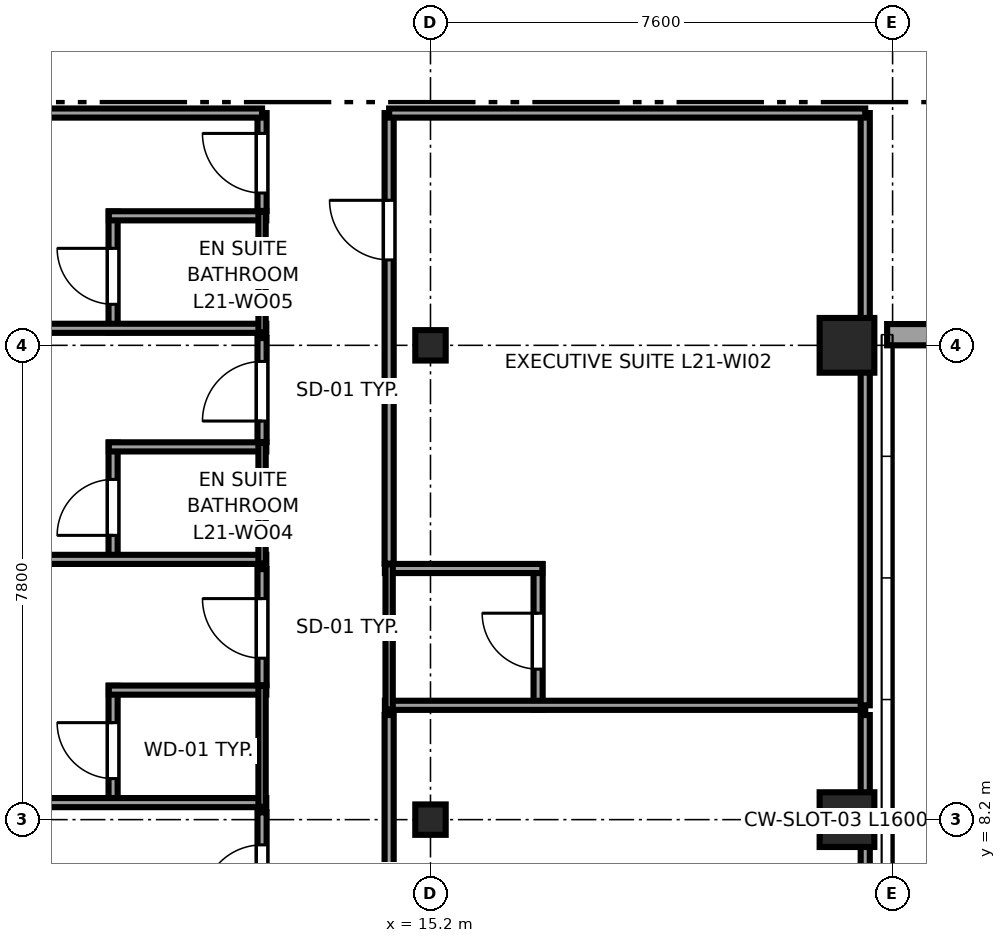
"""IFC4 building model, lengths in metres.
Left out: names, types, materials, properties, quantities, classifications, styles, units other than length and angle.
Written with IfcOpenShell. Run it as: python <this file> out.ifc"""

import sys

from ifc_helpers import new_model, si_unit, direction, frame, frame_2d, origin, origin_2d, place, context, subcontext, project, spatial, rectangle, i_section, extrude, source, transform, mapped, element, fill, save


model = new_model("IFC4")
c1 = context("Model", 3, precision=1e-05, world=origin(), true_north=direction((0.0, 1.0)))
c2 = subcontext(c1, "Body", "Model", "MODEL_VIEW")
j1 = project(units=[si_unit("LENGTHUNIT", "METRE"), si_unit("PLANEANGLEUNIT", "RADIAN")], contexts=[c1])
p1 = place(None, origin())
s1 = spatial("IfcSite", under=j1, at=p1, CompositionType="ELEMENT")
p2 = place(p1, origin())
s2 = spatial("IfcBuilding", under=s1, at=p2, CompositionType="ELEMENT")
p3 = place(p2, frame((0.0, 0.0, 85.25)))
s3 = spatial("IfcBuildingStorey", under=s2, at=p3, CompositionType="ELEMENT", Elevation=85.25)
m1 = source(origin(), c2, "Body", "SweptSolid", [
    extrude(i_section(OverallWidth=0.5, OverallDepth=0.5, WebThickness=0.022, FlangeThickness=0.034, at=origin_2d()), origin(), (0.0, 0.0, 1.0), 3.55),
])
for number, where, z_axis, x_axis in (
    (1, (15.2, 8.2, 0.0), (0.0, 0.0, 1.0), (1.0, 0.0, 0.0)),
    (2, (15.2, 16.0, 0.0), (0.0, 0.0, 1.0), (1.0, 0.0, 0.0)),
):
    element("IfcColumn", number, at=place(p3, frame(where, z_axis=z_axis, x_axis=x_axis)), inside=s3, PredefinedType="COLUMN", context=c2, shape_type="MappedRepresentation", body=[
        mapped(m1, transform((0.0, 0.0, 0.0), x_axis=(1.0, 0.0, 0.0), y_axis=(0.0, 1.0, 0.0), z_axis=(0.0, 0.0, 1.0), scale=1.0)),
    ])
m2 = source(origin(), c2, "Body", "SweptSolid", [
    extrude(rectangle(XDim=0.9, YDim=0.9, at=origin_2d()), origin(), (0.0, 0.0, 1.0), 3.55),
])
for number, where, z_axis, x_axis in (
    (3, (22.05, 8.2, 0.0), (0.0, 0.0, 1.0), (1.0, 0.0, 0.0)),
    (4, (22.05, 16.0, 0.0), (0.0, 0.0, 1.0), (1.0, 0.0, 0.0)),
):
    element("IfcColumn", number, at=place(p3, frame(where, z_axis=z_axis, x_axis=x_axis)), inside=s3, PredefinedType="COLUMN", context=c2, shape_type="MappedRepresentation", body=[
        mapped(m2, transform((0.0, 0.0, 0.0), x_axis=(1.0, 0.0, 0.0), y_axis=(0.0, 1.0, 0.0), z_axis=(0.0, 0.0, 1.0), scale=1.0)),
    ])
p4 = place(p3, frame((22.71, 16.175, 0.0), z_axis=(0.0, 0.0, 1.0), x_axis=(1.0, 0.0, 0.0)))
e5 = element("IfcWall", 5, at=p4, inside=s3, PredefinedType="SOLIDWALL", context=c2, shape_type="SweptSolid", body=[
    extrude(rectangle(XDim=11.58, YDim=0.35, at=frame_2d((5.79, 0.0))), origin(), (0.0, 0.0, 1.0), 2.748),
])
p5 = place(p4, frame((2.145, 0.0, 0.68)))
e6 = element("IfcOpeningElement", 6, at=p5, cuts=e5, PredefinedType="OPENING", context=c2, shape_type="SweptSolid", body=[
    extrude(rectangle(XDim=2.1, YDim=1.9, at=frame_2d((1.05, 0.95))), frame((0.0, 0.185, 0.0), z_axis=(0.0, -1.0, 0.0), x_axis=(1.0, 0.0, 0.0)), (0.0, 0.0, 1.0), 0.37),
])
p6 = place(p4, frame((7.335, 0.0, 0.68)))
e7 = element("IfcOpeningElement", 7, at=p6, cuts=e5, PredefinedType="OPENING", context=c2, shape_type="SweptSolid", body=[
    extrude(rectangle(XDim=2.1, YDim=1.9, at=frame_2d((1.05, 0.95))), frame((0.0, 0.185, 0.0), z_axis=(0.0, -1.0, 0.0), x_axis=(1.0, 0.0, 0.0)), (0.0, 0.0, 1.0), 0.37),
])
p7 = place(p3, frame((9.98, 8.41, 0.0), z_axis=(0.0, 0.0, 1.0), x_axis=(0.0, 1.0, 0.0)))
e8 = element("IfcWall", 8, at=p7, inside=s3, PredefinedType="PARTITIONING", context=c2, shape_type="SweptSolid", body=[
    extrude(rectangle(XDim=1.99, YDim=0.15, at=frame_2d((0.995, 0.0))), origin(), (0.0, 0.0, 1.0), 3.37),
])
p8 = place(p7, frame((0.465, 0.0, 0.0)))
e9 = element("IfcOpeningElement", 9, at=p8, cuts=e8, PredefinedType="OPENING", context=c2, shape_type="SweptSolid", body=[
    extrude(rectangle(XDim=0.92, YDim=2.01, at=frame_2d((0.46, 1.005))), frame((0.0, 0.085, 0.0), z_axis=(0.0, -1.0, 0.0), x_axis=(1.0, 0.0, 0.0)), (0.0, 0.0, 1.0), 0.17),
])
p9 = place(p3, frame((0.405, 8.48, 0.0), z_axis=(0.0, 0.0, 1.0), x_axis=(1.0, 0.0, 0.0)))
e10 = element("IfcWall", 10, at=p9, inside=s3, PredefinedType="PARTITIONING", context=c2, shape_type="SweptSolid", body=[
    extrude(rectangle(XDim=12.095, YDim=0.15, at=frame_2d((6.047, 0.0))), origin(), (0.0, 0.0, 1.0), 3.37),
])
p10 = place(p3, frame((9.91, 10.33, 0.0), z_axis=(0.0, 0.0, 1.0), x_axis=(1.0, 0.0, 0.0)))
e11 = element("IfcWall", 11, at=p10, inside=s3, PredefinedType="PARTITIONING", context=c2, shape_type="SweptSolid", body=[
    extrude(rectangle(XDim=2.59, YDim=0.15, at=frame_2d((1.295, 0.0))), origin(), (0.0, 0.0, 1.0), 3.37),
])
p11 = place(p3, frame((12.43, 8.41, 0.0), z_axis=(0.0, 0.0, 1.0), x_axis=(0.0, 1.0, 0.0)))
e12 = element("IfcWall", 12, at=p11, inside=s3, PredefinedType="PLUMBINGWALL", context=c2, shape_type="SweptSolid", body=[
    extrude(rectangle(XDim=1.99, YDim=0.12, at=frame_2d((0.995, 0.0))), origin(), (0.0, 0.0, 1.0), 3.37),
])
p12 = place(p3, frame((9.98, 12.41, 0.0), z_axis=(0.0, 0.0, 1.0), x_axis=(0.0, 1.0, 0.0)))
e13 = element("IfcWall", 13, at=p12, inside=s3, PredefinedType="PARTITIONING", context=c2, shape_type="SweptSolid", body=[
    extrude(rectangle(XDim=1.99, YDim=0.15, at=frame_2d((0.995, 0.0))), origin(), (0.0, 0.0, 1.0), 3.37),
])
p13 = place(p12, frame((0.465, 0.0, 0.0)))
e14 = element("IfcOpeningElement", 14, at=p13, cuts=e13, PredefinedType="OPENING", context=c2, shape_type="SweptSolid", body=[
    extrude(rectangle(XDim=0.92, YDim=2.01, at=frame_2d((0.46, 1.005))), frame((0.0, 0.085, 0.0), z_axis=(0.0, -1.0, 0.0), x_axis=(1.0, 0.0, 0.0)), (0.0, 0.0, 1.0), 0.17),
])
p14 = place(p3, frame((0.405, 12.48, 0.0), z_axis=(0.0, 0.0, 1.0), x_axis=(1.0, 0.0, 0.0)))
e15 = element("IfcWall", 15, at=p14, inside=s3, PredefinedType="PARTITIONING", context=c2, shape_type="SweptSolid", body=[
    extrude(rectangle(XDim=12.095, YDim=0.15, at=frame_2d((6.047, 0.0))), origin(), (0.0, 0.0, 1.0), 3.37),
])
p15 = place(p3, frame((9.91, 14.33, 0.0), z_axis=(0.0, 0.0, 1.0), x_axis=(1.0, 0.0, 0.0)))
e16 = element("IfcWall", 16, at=p15, inside=s3, PredefinedType="PARTITIONING", context=c2, shape_type="SweptSolid", body=[
    extrude(rectangle(XDim=2.59, YDim=0.15, at=frame_2d((1.295, 0.0))), origin(), (0.0, 0.0, 1.0), 3.37),
])
p16 = place(p3, frame((12.43, 12.41, 0.0), z_axis=(0.0, 0.0, 1.0), x_axis=(0.0, 1.0, 0.0)))
e17 = element("IfcWall", 17, at=p16, inside=s3, PredefinedType="PLUMBINGWALL", context=c2, shape_type="SweptSolid", body=[
    extrude(rectangle(XDim=1.99, YDim=0.12, at=frame_2d((0.995, 0.0))), origin(), (0.0, 0.0, 1.0), 3.37),
])
p17 = place(p3, frame((9.98, 16.21, 0.0), z_axis=(0.0, 0.0, 1.0), x_axis=(0.0, 1.0, 0.0)))
e18 = element("IfcWall", 18, at=p17, inside=s3, PredefinedType="PARTITIONING", context=c2, shape_type="SweptSolid", body=[
    extrude(rectangle(XDim=1.99, YDim=0.15, at=frame_2d((0.995, 0.0))), origin(), (0.0, 0.0, 1.0), 3.37),
])
p18 = place(p17, frame((0.465, 0.0, 0.0)))
e19 = element("IfcOpeningElement", 19, at=p18, cuts=e18, PredefinedType="OPENING", context=c2, shape_type="SweptSolid", body=[
    extrude(rectangle(XDim=0.92, YDim=2.01, at=frame_2d((0.46, 1.005))), frame((0.0, 0.085, 0.0), z_axis=(0.0, -1.0, 0.0), x_axis=(1.0, 0.0, 0.0)), (0.0, 0.0, 1.0), 0.17),
])
p19 = place(p3, frame((0.405, 16.28, 0.0), z_axis=(0.0, 0.0, 1.0), x_axis=(1.0, 0.0, 0.0)))
e20 = element("IfcWall", 20, at=p19, inside=s3, PredefinedType="PARTITIONING", context=c2, shape_type="SweptSolid", body=[
    extrude(rectangle(XDim=12.095, YDim=0.15, at=frame_2d((6.047, 0.0))), origin(), (0.0, 0.0, 1.0), 3.37),
])
p20 = place(p3, frame((9.91, 18.13, 0.0), z_axis=(0.0, 0.0, 1.0), x_axis=(1.0, 0.0, 0.0)))
e21 = element("IfcWall", 21, at=p20, inside=s3, PredefinedType="PARTITIONING", context=c2, shape_type="SweptSolid", body=[
    extrude(rectangle(XDim=2.59, YDim=0.15, at=frame_2d((1.295, 0.0))), origin(), (0.0, 0.0, 1.0), 3.37),
])
p21 = place(p3, frame((12.43, 16.21, 0.0), z_axis=(0.0, 0.0, 1.0), x_axis=(0.0, 1.0, 0.0)))
e22 = element("IfcWall", 22, at=p21, inside=s3, PredefinedType="PLUMBINGWALL", context=c2, shape_type="SweptSolid", body=[
    extrude(rectangle(XDim=1.99, YDim=0.12, at=frame_2d((0.995, 0.0))), origin(), (0.0, 0.0, 1.0), 3.37),
])
p22 = place(p3, frame((16.97, 10.01, 0.0), z_axis=(0.0, 0.0, 1.0), x_axis=(0.0, 1.0, 0.0)))
e23 = element("IfcWall", 23, at=p22, inside=s3, PredefinedType="PARTITIONING", context=c2, shape_type="SweptSolid", body=[
    extrude(rectangle(XDim=2.39, YDim=0.15, at=frame_2d((1.195, 0.0))), origin(), (0.0, 0.0, 1.0), 3.37),
])
p23 = place(p22, frame((0.665, 0.0, 0.0)))
e24 = element("IfcOpeningElement", 24, at=p23, cuts=e23, PredefinedType="OPENING", context=c2, shape_type="SweptSolid", body=[
    extrude(rectangle(XDim=0.92, YDim=2.01, at=frame_2d((0.46, 1.005))), frame((0.0, 0.085, 0.0), z_axis=(0.0, -1.0, 0.0), x_axis=(1.0, 0.0, 0.0)), (0.0, 0.0, 1.0), 0.17),
])
p24 = place(p3, frame((14.45, 10.08, 0.0), z_axis=(0.0, 0.0, 1.0), x_axis=(1.0, 0.0, 0.0)))
e25 = element("IfcWall", 25, at=p24, inside=s3, PredefinedType="PARTITIONING", context=c2, shape_type="SweptSolid", body=[
    extrude(rectangle(XDim=7.9, YDim=0.15, at=frame_2d((3.95, 0.0))), origin(), (0.0, 0.0, 1.0), 3.37),
])
p25 = place(p3, frame((14.45, 12.33, 0.0), z_axis=(0.0, 0.0, 1.0), x_axis=(1.0, 0.0, 0.0)))
e26 = element("IfcWall", 26, at=p25, inside=s3, PredefinedType="PARTITIONING", context=c2, shape_type="SweptSolid", body=[
    extrude(rectangle(XDim=2.59, YDim=0.15, at=frame_2d((1.295, 0.0))), origin(), (0.0, 0.0, 1.0), 3.37),
])
p26 = place(p3, frame((14.52, 10.01, 0.0), z_axis=(0.0, 0.0, 1.0), x_axis=(0.0, 1.0, 0.0)))
e27 = element("IfcWall", 27, at=p26, inside=s3, PredefinedType="PLUMBINGWALL", context=c2, shape_type="SweptSolid", body=[
    extrude(rectangle(XDim=2.39, YDim=0.12, at=frame_2d((1.195, 0.0))), origin(), (0.0, 0.0, 1.0), 3.37),
])
p27 = place(p3, frame((12.43, 6.31, 0.0), z_axis=(0.0, 0.0, 1.0), x_axis=(0.0, 1.0, 0.0)))
e28 = element("IfcWall", 28, at=p27, inside=s3, PredefinedType="PARTITIONING", context=c2, shape_type="SweptSolid", body=[
    extrude(rectangle(XDim=2.01, YDim=0.15, at=frame_2d((1.005, 0.0))), origin(), (0.0, 0.0, 1.0), 3.37),
])
p28 = place(p27, frame((0.495, 0.0, 0.0)))
e29 = element("IfcOpeningElement", 29, at=p28, cuts=e28, PredefinedType="OPENING", context=c2, shape_type="SweptSolid", body=[
    extrude(rectangle(XDim=0.98, YDim=2.12, at=frame_2d((0.49, 1.06))), frame((0.0, 0.085, 0.0), z_axis=(0.0, -1.0, 0.0), x_axis=(1.0, 0.0, 0.0)), (0.0, 0.0, 1.0), 0.17),
])
p29 = place(p3, frame((12.43, 10.41, 0.0), z_axis=(0.0, 0.0, 1.0), x_axis=(0.0, 1.0, 0.0)))
e30 = element("IfcWall", 30, at=p29, inside=s3, PredefinedType="PARTITIONING", context=c2, shape_type="SweptSolid", body=[
    extrude(rectangle(XDim=1.91, YDim=0.15, at=frame_2d((0.955, 0.0))), origin(), (0.0, 0.0, 1.0), 3.37),
])
p30 = place(p29, frame((0.445, 0.0, 0.0)))
e31 = element("IfcOpeningElement", 31, at=p30, cuts=e30, PredefinedType="OPENING", context=c2, shape_type="SweptSolid", body=[
    extrude(rectangle(XDim=0.98, YDim=2.12, at=frame_2d((0.49, 1.06))), frame((0.0, 0.085, 0.0), z_axis=(0.0, -1.0, 0.0), x_axis=(1.0, 0.0, 0.0)), (0.0, 0.0, 1.0), 0.17),
])
p31 = place(p3, frame((12.43, 14.41, 0.0), z_axis=(0.0, 0.0, 1.0), x_axis=(0.0, 1.0, 0.0)))
e32 = element("IfcWall", 32, at=p31, inside=s3, PredefinedType="PARTITIONING", context=c2, shape_type="SweptSolid", body=[
    extrude(rectangle(XDim=1.71, YDim=0.15, at=frame_2d((0.855, 0.0))), origin(), (0.0, 0.0, 1.0), 3.37),
])
p32 = place(p31, frame((0.345, 0.0, 0.0)))
e33 = element("IfcOpeningElement", 33, at=p32, cuts=e32, PredefinedType="OPENING", context=c2, shape_type="SweptSolid", body=[
    extrude(rectangle(XDim=0.98, YDim=2.12, at=frame_2d((0.49, 1.06))), frame((0.0, 0.085, 0.0), z_axis=(0.0, -1.0, 0.0), x_axis=(1.0, 0.0, 0.0)), (0.0, 0.0, 1.0), 0.17),
])
p33 = place(p3, frame((12.43, 18.21, 0.0), z_axis=(0.0, 0.0, 1.0), x_axis=(0.0, 1.0, 0.0)))
e34 = element("IfcWall", 34, at=p33, inside=s3, PredefinedType="PARTITIONING", context=c2, shape_type="SweptSolid", body=[
    extrude(rectangle(XDim=1.61, YDim=0.15, at=frame_2d((0.805, 0.0))), origin(), (0.0, 0.0, 1.0), 3.37),
])
p34 = place(p33, frame((0.295, 0.0, 0.0)))
e35 = element("IfcOpeningElement", 35, at=p34, cuts=e34, PredefinedType="OPENING", context=c2, shape_type="SweptSolid", body=[
    extrude(rectangle(XDim=0.98, YDim=2.12, at=frame_2d((0.49, 1.06))), frame((0.0, 0.085, 0.0), z_axis=(0.0, -1.0, 0.0), x_axis=(1.0, 0.0, 0.0)), (0.0, 0.0, 1.0), 0.17),
])
p35 = place(p3, frame((0.405, 19.82, 0.0), z_axis=(0.0, 0.0, 1.0), x_axis=(1.0, 0.0, 0.0)))
e36 = element("IfcWall", 36, at=p35, inside=s3, PredefinedType="PARTITIONING", context=c2, shape_type="SweptSolid", body=[
    extrude(rectangle(XDim=12.025, YDim=0.15, at=frame_2d((6.012, 0.0))), origin(), (0.0, 0.0, 1.0), 3.37),
])
p36 = place(p3, frame((14.52, 3.31, 0.0), z_axis=(0.0, 0.0, 1.0), x_axis=(0.0, 1.0, 0.0)))
e37 = element("IfcWall", 37, at=p36, inside=s3, PredefinedType="PARTITIONING", context=c2, shape_type="SweptSolid", body=[
    extrude(rectangle(XDim=6.61, YDim=0.15, at=frame_2d((3.305, 0.0))), origin(), (0.0, 0.0, 1.0), 3.37),
])
p37 = place(p36, frame((2.495, 0.0, 0.0)))
e38 = element("IfcOpeningElement", 38, at=p37, cuts=e37, PredefinedType="OPENING", context=c2, shape_type="SweptSolid", body=[
    extrude(rectangle(XDim=0.98, YDim=2.12, at=frame_2d((0.49, 1.06))), frame((0.0, 0.085, 0.0), z_axis=(0.0, -1.0, 0.0), x_axis=(1.0, 0.0, 0.0)), (0.0, 0.0, 1.0), 0.17),
])
p38 = place(p3, frame((22.35, 0.405, 0.0), z_axis=(0.0, 0.0, 1.0), x_axis=(0.0, 1.0, 0.0)))
e39 = element("IfcWall", 39, at=p38, inside=s3, PredefinedType="PARTITIONING", context=c2, shape_type="SweptSolid", body=[
    extrude(rectangle(XDim=9.515, YDim=0.15, at=frame_2d((4.757, 0.0))), origin(), (0.0, 0.0, 1.0), 3.37),
])
p39 = place(p3, frame((14.52, 12.41, 0.0), z_axis=(0.0, 0.0, 1.0), x_axis=(0.0, 1.0, 0.0)))
e40 = element("IfcWall", 40, at=p39, inside=s3, PredefinedType="PARTITIONING", context=c2, shape_type="SweptSolid", body=[
    extrude(rectangle(XDim=7.41, YDim=0.15, at=frame_2d((3.705, 0.0))), origin(), (0.0, 0.0, 1.0), 3.37),
])
p40 = place(p39, frame((4.995, 0.0, 0.0)))
e41 = element("IfcOpeningElement", 41, at=p40, cuts=e40, PredefinedType="OPENING", context=c2, shape_type="SweptSolid", body=[
    extrude(rectangle(XDim=0.98, YDim=2.12, at=frame_2d((0.49, 1.06))), frame((0.0, 0.085, 0.0), z_axis=(0.0, -1.0, 0.0), x_axis=(1.0, 0.0, 0.0)), (0.0, 0.0, 1.0), 0.17),
])
p41 = place(p3, frame((22.35, 10.08, 0.0), z_axis=(0.0, 0.0, 1.0), x_axis=(0.0, 1.0, 0.0)))
e42 = element("IfcWall", 42, at=p41, inside=s3, PredefinedType="PARTITIONING", context=c2, shape_type="SweptSolid", body=[
    extrude(rectangle(XDim=9.74, YDim=0.15, at=frame_2d((4.87, 0.0))), origin(), (0.0, 0.0, 1.0), 3.37),
])
p42 = place(p3, frame((14.52, 19.82, 0.0), z_axis=(0.0, 0.0, 1.0), x_axis=(1.0, 0.0, 0.0)))
e43 = element("IfcWall", 43, at=p42, inside=s3, PredefinedType="PARTITIONING", context=c2, shape_type="SweptSolid", body=[
    extrude(rectangle(XDim=7.83, YDim=0.15, at=frame_2d((3.915, 0.0))), origin(), (0.0, 0.0, 1.0), 3.37),
])
m3 = source(origin(), c2, "Body", "SweptSolid", [
    extrude(rectangle(XDim=0.92, YDim=2.01, at=frame_2d((0.46, 1.005))), frame((0.0, 0.025, 0.0), z_axis=(0.0, -1.0, 0.0), x_axis=(1.0, 0.0, 0.0)), (0.0, 0.0, 1.0), 0.05),
])
p43 = place(p8, origin())
e44 = element("IfcDoor", 44, at=p43, inside=s3, OperationType="SINGLE_SWING_RIGHT", PredefinedType="DOOR", context=c2, shape_type="MappedRepresentation", body=[
    mapped(m3, transform((0.0, 0.0, 0.0), x_axis=(1.0, 0.0, 0.0), y_axis=(0.0, 1.0, 0.0), z_axis=(0.0, 0.0, 1.0), scale=1.0)),
])
fill(e9, e44)
p44 = place(p13, origin())
e45 = element("IfcDoor", 45, at=p44, inside=s3, OperationType="SINGLE_SWING_LEFT", PredefinedType="DOOR", context=c2, shape_type="MappedRepresentation", body=[
    mapped(m3, transform((0.0, 0.0, 0.0), x_axis=(1.0, 0.0, 0.0), y_axis=(0.0, 1.0, 0.0), z_axis=(0.0, 0.0, 1.0), scale=1.0)),
])
fill(e14, e45)
p45 = place(p18, origin())
e46 = element("IfcDoor", 46, at=p45, inside=s3, OperationType="SINGLE_SWING_RIGHT", PredefinedType="DOOR", context=c2, shape_type="MappedRepresentation", body=[
    mapped(m3, transform((0.0, 0.0, 0.0), x_axis=(1.0, 0.0, 0.0), y_axis=(0.0, 1.0, 0.0), z_axis=(0.0, 0.0, 1.0), scale=1.0)),
])
fill(e19, e46)
p46 = place(p23, origin())
e47 = element("IfcDoor", 47, at=p46, inside=s3, OperationType="SINGLE_SWING_RIGHT", PredefinedType="DOOR", context=c2, shape_type="MappedRepresentation", body=[
    mapped(m3, transform((0.0, 0.0, 0.0), x_axis=(1.0, 0.0, 0.0), y_axis=(0.0, 1.0, 0.0), z_axis=(0.0, 0.0, 1.0), scale=1.0)),
])
fill(e24, e47)
m4 = source(origin(), c2, "Body", "SweptSolid", [
    extrude(rectangle(XDim=0.98, YDim=2.12, at=frame_2d((0.49, 1.06))), frame((0.0, 0.025, 0.0), z_axis=(0.0, -1.0, 0.0), x_axis=(1.0, 0.0, 0.0)), (0.0, 0.0, 1.0), 0.05),
])
p47 = place(p28, origin())
e48 = element("IfcDoor", 48, at=p47, inside=s3, OperationType="SINGLE_SWING_LEFT", PredefinedType="DOOR", context=c2, shape_type="MappedRepresentation", body=[
    mapped(m4, transform((0.0, 0.0, 0.0), x_axis=(1.0, 0.0, 0.0), y_axis=(0.0, 1.0, 0.0), z_axis=(0.0, 0.0, 1.0), scale=1.0)),
])
fill(e29, e48)
p48 = place(p30, origin())
e49 = element("IfcDoor", 49, at=p48, inside=s3, OperationType="SINGLE_SWING_RIGHT", PredefinedType="DOOR", context=c2, shape_type="MappedRepresentation", body=[
    mapped(m4, transform((0.0, 0.0, 0.0), x_axis=(1.0, 0.0, 0.0), y_axis=(0.0, 1.0, 0.0), z_axis=(0.0, 0.0, 1.0), scale=1.0)),
])
fill(e31, e49)
p49 = place(p32, origin())
e50 = element("IfcDoor", 50, at=p49, inside=s3, OperationType="SINGLE_SWING_LEFT", PredefinedType="DOOR", context=c2, shape_type="MappedRepresentation", body=[
    mapped(m4, transform((0.0, 0.0, 0.0), x_axis=(1.0, 0.0, 0.0), y_axis=(0.0, 1.0, 0.0), z_axis=(0.0, 0.0, 1.0), scale=1.0)),
])
fill(e33, e50)
p50 = place(p34, origin())
e51 = element("IfcDoor", 51, at=p50, inside=s3, OperationType="SINGLE_SWING_RIGHT", PredefinedType="DOOR", context=c2, shape_type="MappedRepresentation", body=[
    mapped(m4, transform((0.0, 0.0, 0.0), x_axis=(1.0, 0.0, 0.0), y_axis=(0.0, 1.0, 0.0), z_axis=(0.0, 0.0, 1.0), scale=1.0)),
])
fill(e35, e51)
p51 = place(p40, origin())
e52 = element("IfcDoor", 52, at=p51, inside=s3, OperationType="SINGLE_SWING_RIGHT", PredefinedType="DOOR", context=c2, shape_type="MappedRepresentation", body=[
    mapped(m4, transform((0.0, 0.0, 0.0), x_axis=(1.0, 0.0, 0.0), y_axis=(0.0, 1.0, 0.0), z_axis=(0.0, 0.0, 1.0), scale=1.0)),
])
fill(e41, e52)
save(model, sys.argv[1])
